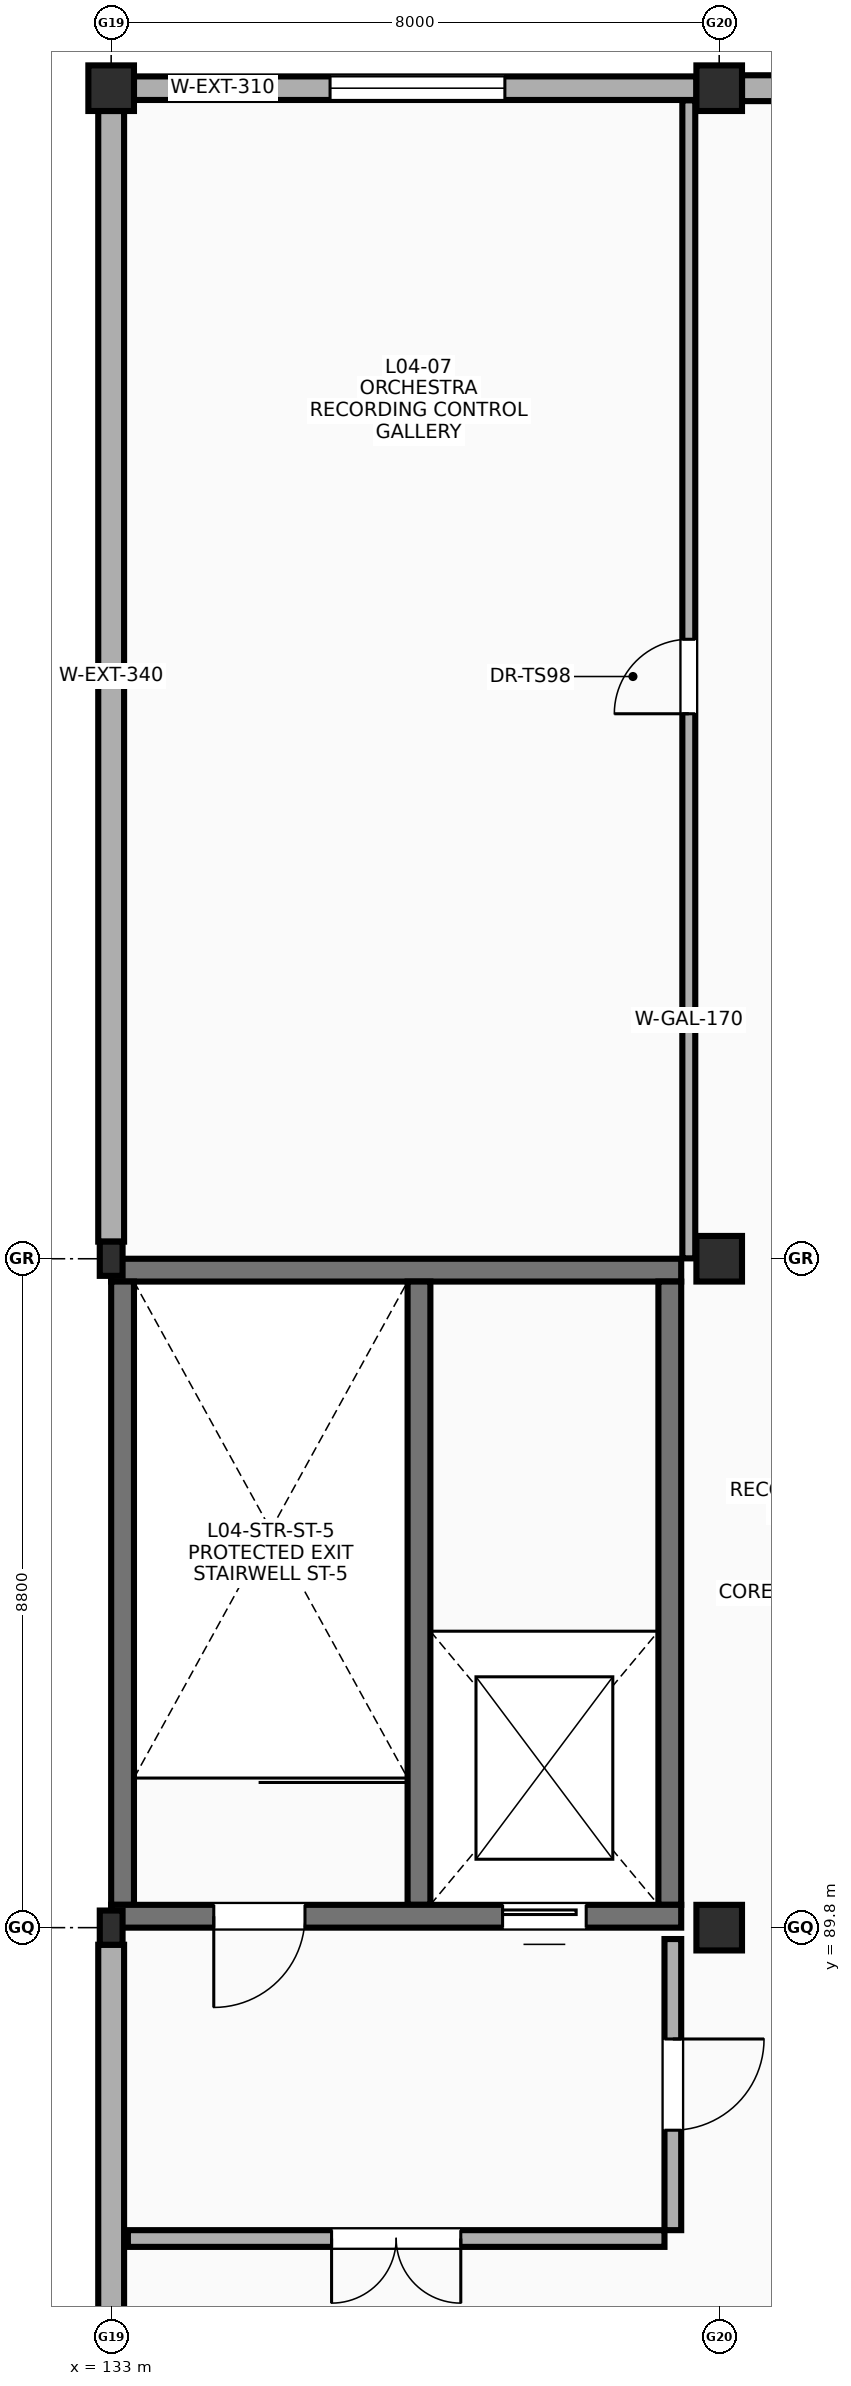
"""IFC4 building model, lengths in metres.
Left out: names, types, materials, properties, quantities, classifications, styles, units other than length and angle.
Written with IfcOpenShell. Run it as: python <this file> out.ifc"""

import sys

from ifc_helpers import new_model, si_unit, direction, frame, frame_2d, origin, origin_2d, place, context, subcontext, project, spatial, rectangle, i_section, extrude, element, fill, save


model = new_model("IFC4")
c1 = context("Model", 3, precision=1e-05, world=origin(), true_north=direction((0.0, 1.0)))
c2 = subcontext(c1, "Body", "Model", "MODEL_VIEW")
j1 = project(units=[si_unit("LENGTHUNIT", "METRE"), si_unit("PLANEANGLEUNIT", "RADIAN")], contexts=[c1])
p1 = place(None, origin())
s1 = spatial("IfcSite", under=j1, at=p1, CompositionType="ELEMENT")
p2 = place(p1, origin())
s2 = spatial("IfcBuilding", under=s1, at=p2, CompositionType="ELEMENT")
p3 = place(p2, frame((0.0, 0.0, 18.0)))
s3 = spatial("IfcBuildingStorey", under=s2, at=p3, CompositionType="ELEMENT", Elevation=18.0)
for number, where, z_axis, x_axis in (
    (1, (133.0, 89.8, 0.0), (0.0, 0.0, 1.0), (1.0, 0.0, 0.0)),
    (2, (133.0, 98.6, 0.0), (0.0, 0.0, 1.0), (1.0, 0.0, 0.0)),
):
    element("IfcColumn", number, at=place(p3, frame(where, z_axis=z_axis, x_axis=x_axis)), inside=s3, PredefinedType="COLUMN", context=c2, shape_type="SweptSolid", body=[
        extrude(i_section(OverallWidth=0.3, OverallDepth=0.45, WebThickness=0.014, FlangeThickness=0.026, FilletRadius=0.027, at=origin_2d()), origin(), (0.0, 0.0, 1.0), 5.4),
    ])
for number, where, z_axis, x_axis in (
    (3, (141.0, 89.8, 0.0), (0.0, 0.0, 1.0), (1.0, 0.0, 0.0)),
    (4, (141.0, 98.6, 0.0), (0.0, 0.0, 1.0), (1.0, 0.0, 0.0)),
    (5, (133.0, 114.0, 0.0), (0.0, 0.0, 1.0), (1.0, 0.0, 0.0)),
    (6, (141.0, 114.0, 0.0), (0.0, 0.0, 1.0), (1.0, 0.0, 0.0)),
):
    element("IfcColumn", number, at=place(p3, frame(where, z_axis=z_axis, x_axis=x_axis)), inside=s3, PredefinedType="COLUMN", context=c2, shape_type="SweptSolid", body=[
        extrude(rectangle(XDim=0.6, YDim=0.6, at=origin_2d()), origin(), (0.0, 0.0, 1.0), 5.4),
    ])
p4 = place(p3, frame((133.0, 98.45, 0.0), z_axis=(0.0, 0.0, 1.0), x_axis=(1.0, 0.0, 0.0)))
e7 = element("IfcWall", 7, at=p4, inside=s3, PredefinedType="SHEAR", context=c2, shape_type="SweptSolid", body=[
    extrude(rectangle(XDim=7.5, YDim=0.3, at=frame_2d((3.75, 0.0))), origin(), (0.0, 0.0, 1.0), 5.4),
])
for number, where, z_axis, x_axis in (
    (8, (133.15, 90.1, 0.0), (0.0, 0.0, 1.0), (0.0, 1.0, 0.0)),
    (9, (140.35, 90.1, 0.0), (0.0, 0.0, 1.0), (0.0, 1.0, 0.0)),
    (10, (137.05, 90.1, 0.0), (0.0, 0.0, 1.0), (0.0, 1.0, 0.0)),
):
    element("IfcWall", number, at=place(p3, frame(where, z_axis=z_axis, x_axis=x_axis)), inside=s3, PredefinedType="SHEAR", context=c2, shape_type="SweptSolid", body=[
        extrude(rectangle(XDim=8.2, YDim=0.3, at=frame_2d((4.1, 0.0))), origin(), (0.0, 0.0, 1.0), 5.4),
    ])
p5 = place(p3, frame((133.3, 114.0, 0.0), z_axis=(0.0, 0.0, 1.0), x_axis=(1.0, 0.0, 0.0)))
e11 = element("IfcWall", 11, at=p5, inside=s3, PredefinedType="SOLIDWALL", context=c2, shape_type="SweptSolid", body=[
    extrude(rectangle(XDim=7.4, YDim=0.31, at=frame_2d((3.7, 0.0))), origin(), (0.0, 0.0, 1.0), 3.85),
])
p6 = place(p5, frame((2.58, 0.0, 0.95)))
e12 = element("IfcOpeningElement", 12, at=p6, cuts=e11, PredefinedType="OPENING", context=c2, shape_type="SweptSolid", body=[
    extrude(rectangle(XDim=2.3, YDim=1.7, at=frame_2d((1.15, 0.85))), frame((0.0, 0.165, 0.0), z_axis=(0.0, -1.0, 0.0), x_axis=(1.0, 0.0, 0.0)), (0.0, 0.0, 1.0), 0.33),
])
p7 = place(p3, frame((133.0, 81.425, 0.0), z_axis=(0.0, 0.0, 1.0), x_axis=(0.0, 1.0, 0.0)))
e13 = element("IfcWall", 13, at=p7, inside=s3, PredefinedType="SOLIDWALL", context=c2, shape_type="SweptSolid", body=[
    extrude(rectangle(XDim=8.15, YDim=0.34, at=frame_2d((4.075, 0.0))), origin(), (0.0, 0.0, 1.0), 3.85),
])
p8 = place(p3, frame((133.0, 98.825, 0.0), z_axis=(0.0, 0.0, 1.0), x_axis=(0.0, 1.0, 0.0)))
e14 = element("IfcWall", 14, at=p8, inside=s3, PredefinedType="SOLIDWALL", context=c2, shape_type="SweptSolid", body=[
    extrude(rectangle(XDim=14.875, YDim=0.34, at=frame_2d((7.438, 0.0))), origin(), (0.0, 0.0, 1.0), 3.85),
])
p9 = place(p3, frame((141.3, 114.0, 0.0), z_axis=(0.0, 0.0, 1.0), x_axis=(1.0, 0.0, 0.0)))
e15 = element("IfcWall", 15, at=p9, inside=s3, PredefinedType="SOLIDWALL", context=c2, shape_type="SweptSolid", body=[
    extrude(rectangle(XDim=28.4, YDim=0.34, at=frame_2d((14.2, 0.0))), origin(), (0.0, 0.0, 1.0), 3.85),
])
p10 = place(p3, frame((133.0, 89.95, 0.0), z_axis=(0.0, 0.0, 1.0), x_axis=(1.0, 0.0, 0.0)))
e16 = element("IfcWall", 16, at=p10, inside=s3, PredefinedType="SHEAR", context=c2, shape_type="SweptSolid", body=[
    extrude(rectangle(XDim=7.5, YDim=0.3, at=frame_2d((3.75, 0.0))), origin(), (0.0, 0.0, 1.0), 5.4),
])
p11 = place(p10, frame((2.55, 0.0, 0.0), z_axis=(0.0, 0.0, 1.0), x_axis=(-1.0, 0.0, 0.0)))
e17 = element("IfcOpeningElement", 17, at=p11, cuts=e16, PredefinedType="OPENING", context=c2, shape_type="SweptSolid", body=[
    extrude(rectangle(XDim=1.2, YDim=2.15, at=frame_2d((0.6, 1.075))), frame((0.0, 0.16, 0.0), z_axis=(0.0, -1.0, 0.0), x_axis=(1.0, 0.0, 0.0)), (0.0, 0.0, 1.0), 0.32),
])
p12 = place(p10, frame((5.15, 0.0, 0.0)))
e18 = element("IfcOpeningElement", 18, at=p12, cuts=e16, PredefinedType="OPENING", context=c2, shape_type="SweptSolid", body=[
    extrude(rectangle(XDim=1.1, YDim=2.15, at=frame_2d((0.55, 1.075))), frame((0.0, 0.16, 0.0), z_axis=(0.0, -1.0, 0.0), x_axis=(1.0, 0.0, 0.0)), (0.0, 0.0, 1.0), 0.32),
])
p13 = place(p3, frame((133.22, 85.71, 0.0), z_axis=(0.0, 0.0, 1.0), x_axis=(1.0, 0.0, 0.0)))
e19 = element("IfcWall", 19, at=p13, inside=s3, PredefinedType="SOLIDWALL", context=c2, shape_type="SweptSolid", body=[
    extrude(rectangle(XDim=7.06, YDim=0.22, at=frame_2d((3.53, 0.0))), origin(), (0.0, 0.0, 1.0), 4.3),
])
p14 = place(p13, frame((4.38, 0.0, 0.0), z_axis=(0.0, 0.0, 1.0), x_axis=(-1.0, 0.0, 0.0)))
e20 = element("IfcOpeningElement", 20, at=p14, cuts=e19, PredefinedType="OPENING", context=c2, shape_type="SweptSolid", body=[
    extrude(rectangle(XDim=1.7, YDim=2.18, at=frame_2d((0.85, 1.09))), frame((0.0, 0.12, 0.0), z_axis=(0.0, -1.0, 0.0), x_axis=(1.0, 0.0, 0.0)), (0.0, 0.0, 1.0), 0.24),
])
p15 = place(p3, frame((140.39, 85.82, 0.0), z_axis=(0.0, 0.0, 1.0), x_axis=(0.0, 1.0, 0.0)))
e21 = element("IfcWall", 21, at=p15, inside=s3, PredefinedType="SOLIDWALL", context=c2, shape_type="SweptSolid", body=[
    extrude(rectangle(XDim=3.83, YDim=0.22, at=frame_2d((1.915, 0.0))), origin(), (0.0, 0.0, 1.0), 4.3),
])
p16 = place(p15, frame((2.515, 0.0, 0.0), z_axis=(0.0, 0.0, 1.0), x_axis=(-1.0, 0.0, 0.0)))
e22 = element("IfcOpeningElement", 22, at=p16, cuts=e21, PredefinedType="OPENING", context=c2, shape_type="SweptSolid", body=[
    extrude(rectangle(XDim=1.2, YDim=2.15, at=frame_2d((0.6, 1.075))), frame((0.0, 0.12, 0.0), z_axis=(0.0, -1.0, 0.0), x_axis=(1.0, 0.0, 0.0)), (0.0, 0.0, 1.0), 0.24),
])
p17 = place(p3, frame((140.6, 98.605, 0.0), z_axis=(0.0, 0.0, 1.0), x_axis=(0.0, 1.0, 0.0)))
e23 = element("IfcWall", 23, at=p17, inside=s3, PredefinedType="PARTITIONING", context=c2, shape_type="SweptSolid", body=[
    extrude(rectangle(XDim=15.235, YDim=0.17, at=frame_2d((7.618, 0.0))), origin(), (0.0, 0.0, 1.0), 4.3),
])
p18 = place(p17, frame((7.165, 0.0, 0.0)))
e24 = element("IfcOpeningElement", 24, at=p18, cuts=e23, PredefinedType="OPENING", context=c2, shape_type="SweptSolid", body=[
    extrude(rectangle(XDim=0.98, YDim=2.15, at=frame_2d((0.49, 1.075))), frame((0.0, 0.095, 0.0), z_axis=(0.0, -1.0, 0.0), x_axis=(1.0, 0.0, 0.0)), (0.0, 0.0, 1.0), 0.19),
])
p19 = place(p6, origin())
e25 = element("IfcWindow", 25, at=p19, inside=s3, PartitioningType="SINGLE_PANEL", PredefinedType="WINDOW", context=c2, shape_type="SweptSolid", body=[
    extrude(rectangle(XDim=2.3, YDim=1.7, at=frame_2d((1.15, 0.85))), frame((0.0, 0.03, 0.0), z_axis=(0.0, -1.0, 0.0), x_axis=(1.0, 0.0, 0.0)), (0.0, 0.0, 1.0), 0.06),
])
fill(e12, e25)
p20 = place(p11, origin())
e26 = element("IfcDoor", 26, at=p20, inside=s3, OperationType="SINGLE_SWING_RIGHT", PredefinedType="DOOR", context=c2, shape_type="SweptSolid", body=[
    extrude(rectangle(XDim=1.2, YDim=2.15, at=frame_2d((0.6, 1.075))), frame((0.0, 0.025, 0.0), z_axis=(0.0, -1.0, 0.0), x_axis=(1.0, 0.0, 0.0)), (0.0, 0.0, 1.0), 0.05),
])
fill(e17, e26)
p21 = place(p12, origin())
e27 = element("IfcDoor", 27, at=p21, inside=s3, OperationType="SLIDING_TO_LEFT", PredefinedType="DOOR", context=c2, shape_type="SweptSolid", body=[
    extrude(rectangle(XDim=1.1, YDim=2.15, at=frame_2d((0.55, 1.075))), frame((0.0, 0.025, 0.0), z_axis=(0.0, -1.0, 0.0), x_axis=(1.0, 0.0, 0.0)), (0.0, 0.0, 1.0), 0.05),
])
fill(e18, e27)
p22 = place(p14, origin())
e28 = element("IfcDoor", 28, at=p22, inside=s3, OperationType="DOUBLE_DOOR_SINGLE_SWING", PredefinedType="DOOR", context=c2, shape_type="SweptSolid", body=[
    extrude(rectangle(XDim=1.7, YDim=2.18, at=frame_2d((0.85, 1.09))), frame((0.0, 0.025, 0.0), z_axis=(0.0, -1.0, 0.0), x_axis=(1.0, 0.0, 0.0)), (0.0, 0.0, 1.0), 0.05),
])
fill(e20, e28)
p23 = place(p16, origin())
e29 = element("IfcDoor", 29, at=p23, inside=s3, OperationType="SINGLE_SWING_LEFT", PredefinedType="DOOR", context=c2, shape_type="SweptSolid", body=[
    extrude(rectangle(XDim=1.2, YDim=2.15, at=frame_2d((0.6, 1.075))), frame((0.0, 0.025, 0.0), z_axis=(0.0, -1.0, 0.0), x_axis=(1.0, 0.0, 0.0)), (0.0, 0.0, 1.0), 0.05),
])
fill(e22, e29)
p24 = place(p18, origin())
e30 = element("IfcDoor", 30, at=p24, inside=s3, OperationType="SINGLE_SWING_LEFT", PredefinedType="DOOR", context=c2, shape_type="SweptSolid", body=[
    extrude(rectangle(XDim=0.98, YDim=2.15, at=frame_2d((0.49, 1.075))), frame((0.0, 0.025, 0.0), z_axis=(0.0, -1.0, 0.0), x_axis=(1.0, 0.0, 0.0)), (0.0, 0.0, 1.0), 0.05),
])
fill(e24, e30)
save(model, sys.argv[1])
